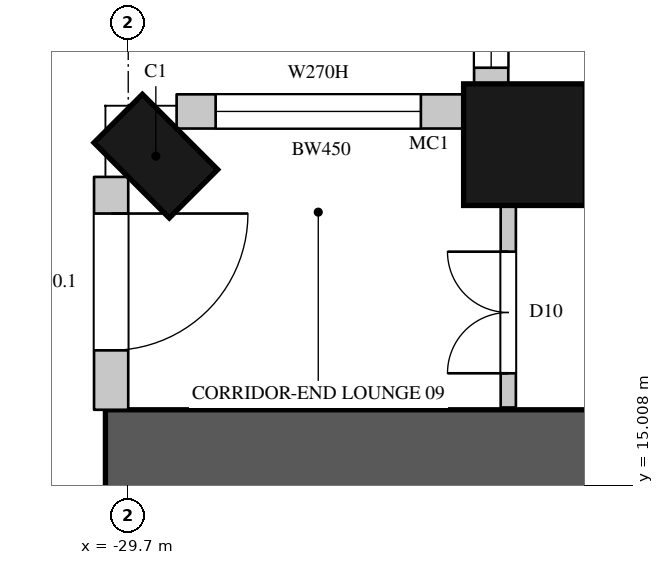
"""IFC4 building model, lengths in metres.
Left out: names, types, materials, properties, quantities, classifications, styles, units other than length and angle.
Written with IfcOpenShell. Run it as: python <this file> out.ifc"""

import sys

from ifc_helpers import new_model, si_unit, direction, frame, frame_2d, origin, origin_2d, place, context, subcontext, project, spatial, rectangle, circle, extrude, element, fill, save


model = new_model("IFC4")
c1 = context("Model", 3, precision=1e-05, world=origin(), true_north=direction((0.0, 1.0)))
c2 = subcontext(c1, "Body", "Model", "MODEL_VIEW")
j1 = project(units=[si_unit("LENGTHUNIT", "METRE"), si_unit("PLANEANGLEUNIT", "RADIAN")], contexts=[c1])
p1 = place(None, origin())
s1 = spatial("IfcSite", under=j1, at=p1, CompositionType="ELEMENT")
p2 = place(p1, origin())
s2 = spatial("IfcBuilding", under=s1, at=p2, CompositionType="ELEMENT")
p3 = place(p2, frame((0.0, 0.0, 62.7)))
s3 = spatial("IfcBuildingStorey", under=s2, at=p3, CompositionType="ELEMENT", Elevation=62.7)
p4 = place(p3, frame((-29.337, 19.337, 0.0), z_axis=(0.0, 0.0, 1.0), x_axis=(-0.707106781187, -0.707106781187, 0.0)))
e1 = element("IfcColumn", 1, at=p4, inside=s3, PredefinedType="COLUMN", context=c2, shape_type="SweptSolid", body=[
    extrude(rectangle(XDim=0.9, YDim=1.4, at=origin_2d()), origin(), (0.0, 0.0, 1.0), 3.6),
])
p5 = place(p3, frame((-24.488, 19.488, 0.0), z_axis=(0.0, 0.0, 1.0), x_axis=(1.0, 0.0, 0.0)))
e2 = element("IfcColumn", 2, at=p5, inside=s3, PredefinedType="COLUMN", context=c2, shape_type="SweptSolid", body=[
    extrude(circle(Radius=0.8, at=origin_2d()), origin(), (0.0, 0.0, 1.0), 3.6),
])
p6 = place(p3, frame((-29.925, 19.064, 0.0), z_axis=(0.0, 0.0, 1.0), x_axis=(0.0, -1.0, 0.0)))
e3 = element("IfcWall", 3, at=p6, inside=s3, PredefinedType="SOLIDWALL", context=c2, shape_type="SweptSolid", body=[
    extrude(rectangle(XDim=3.064, YDim=0.45, at=frame_2d((1.532, 0.0))), origin(), (0.0, 0.0, 1.0), 3.3),
])
p7 = place(p6, frame((0.482, 0.0, 0.0)))
e4 = element("IfcOpeningElement", 4, at=p7, cuts=e3, PredefinedType="OPENING", context=c2, shape_type="SweptSolid", body=[
    extrude(rectangle(XDim=1.8, YDim=2.4, at=frame_2d((0.9, 1.2))), frame((0.0, 0.235, 0.0), z_axis=(0.0, -1.0, 0.0), x_axis=(1.0, 0.0, 0.0)), (0.0, 0.0, 1.0), 0.47),
])
p8 = place(p3, frame((-24.925, 22.05, 0.0), z_axis=(0.0, 0.0, 1.0), x_axis=(0.0, -1.0, 0.0)))
e5 = element("IfcWall", 5, at=p8, inside=s3, PredefinedType="SOLIDWALL", context=c2, shape_type="SweptSolid", body=[
    extrude(rectangle(XDim=1.792, YDim=0.45, at=frame_2d((0.896, 0.0))), origin(), (0.0, 0.0, 1.0), 3.3),
])
p9 = place(p8, frame((0.35, 0.0, 1.05)))
e6 = element("IfcOpeningElement", 6, at=p9, cuts=e5, PredefinedType="OPENING", context=c2, shape_type="SweptSolid", body=[
    extrude(rectangle(XDim=1.2, YDim=2.0, at=frame_2d((0.6, 1.0))), frame((0.0, 0.235, 0.0), z_axis=(0.0, -1.0, 0.0), x_axis=(1.0, 0.0, 0.0)), (0.0, 0.0, 1.0), 0.47),
])
p10 = place(p3, frame((-25.259, 19.925, 0.0), z_axis=(0.0, 0.0, 1.0), x_axis=(-1.0, 0.0, 0.0)))
e7 = element("IfcWall", 7, at=p10, inside=s3, PredefinedType="SOLIDWALL", context=c2, shape_type="SweptSolid", body=[
    extrude(rectangle(XDim=3.805, YDim=0.45, at=frame_2d((1.903, 0.0))), origin(), (0.0, 0.0, 1.0), 3.3),
])
p11 = place(p10, frame((0.592, 0.0, 1.05)))
e8 = element("IfcOpeningElement", 8, at=p11, cuts=e7, PredefinedType="OPENING", context=c2, shape_type="SweptSolid", body=[
    extrude(rectangle(XDim=2.7, YDim=2.0, at=frame_2d((1.35, 1.0))), frame((0.0, 0.235, 0.0), z_axis=(0.0, -1.0, 0.0), x_axis=(1.0, 0.0, 0.0)), (0.0, 0.0, 1.0), 0.47),
])
p12 = place(p3, frame((-30.0, 15.4, 0.0), z_axis=(0.0, 0.0, 1.0), x_axis=(1.0, 0.0, 0.0)))
e9 = element("IfcWall", 9, at=p12, inside=s3, PredefinedType="SHEAR", context=c2, shape_type="SweptSolid", body=[
    extrude(rectangle(XDim=16.0, YDim=1.2, at=frame_2d((8.0, 0.0))), origin(), (0.0, 0.0, 1.0), 3.6),
])
p13 = place(p12, frame((13.4, 0.0, 0.0)))
e10 = element("IfcOpeningElement", 10, at=p13, cuts=e9, PredefinedType="OPENING", context=c2, shape_type="SweptSolid", body=[
    extrude(rectangle(XDim=1.5, YDim=2.4, at=frame_2d((0.75, 1.2))), frame((0.0, 0.61, 0.0), z_axis=(0.0, -1.0, 0.0), x_axis=(1.0, 0.0, 0.0)), (0.0, 0.0, 1.0), 1.22),
])
p14 = place(p3, frame((-24.7, 16.03, 0.0), z_axis=(0.0, 0.0, 1.0), x_axis=(0.0, 1.0, 0.0)))
e11 = element("IfcWall", 11, at=p14, inside=s3, PredefinedType="PARTITIONING", context=c2, shape_type="SweptSolid", body=[
    extrude(rectangle(XDim=2.67, YDim=0.2, at=frame_2d((1.335, 0.0))), origin(), (0.0, 0.0, 1.0), 3.3),
])
p15 = place(p14, frame((0.45, 0.0, 0.0)))
e12 = element("IfcOpeningElement", 12, at=p15, cuts=e11, PredefinedType="OPENING", context=c2, shape_type="SweptSolid", body=[
    extrude(rectangle(XDim=1.6, YDim=2.4, at=frame_2d((0.8, 1.2))), frame((0.0, 0.11, 0.0), z_axis=(0.0, -1.0, 0.0), x_axis=(1.0, 0.0, 0.0)), (0.0, 0.0, 1.0), 0.22),
])
p16 = place(p3, frame((-23.7, 19.7, 0.0), z_axis=(0.0, 0.0, 1.0), x_axis=(1.0, 0.0, 0.0)))
e13 = element("IfcWall", 13, at=p16, inside=s3, PredefinedType="PARTITIONING", context=c2, shape_type="SweptSolid", body=[
    extrude(rectangle(XDim=5.1, YDim=0.2, at=frame_2d((2.55, 0.0))), origin(), (0.0, 0.0, 1.0), 3.3),
])
p17 = place(p16, frame((0.8, 0.0, 0.0)))
e14 = element("IfcOpeningElement", 14, at=p17, cuts=e13, PredefinedType="OPENING", context=c2, shape_type="SweptSolid", body=[
    extrude(rectangle(XDim=0.9, YDim=2.2, at=frame_2d((0.45, 1.1))), frame((0.0, 0.11, 0.0), z_axis=(0.0, -1.0, 0.0), x_axis=(1.0, 0.0, 0.0)), (0.0, 0.0, 1.0), 0.22),
])
p18 = place(p16, frame((3.85, 0.0, 0.0)))
e15 = element("IfcOpeningElement", 15, at=p18, cuts=e13, PredefinedType="OPENING", context=c2, shape_type="SweptSolid", body=[
    extrude(rectangle(XDim=0.95, YDim=2.2, at=frame_2d((0.475, 1.1))), frame((0.0, 0.11, 0.0), z_axis=(0.0, -1.0, 0.0), x_axis=(1.0, 0.0, 0.0)), (0.0, 0.0, 1.0), 0.22),
])
p19 = place(p7, origin())
e16 = element("IfcDoor", 16, at=p19, inside=s3, OperationType="SLIDING_TO_LEFT", PredefinedType="DOOR", context=c2, shape_type="SweptSolid", body=[
    extrude(rectangle(XDim=1.8, YDim=2.4, at=frame_2d((0.9, 1.2))), frame((0.0, 0.13, 0.0), z_axis=(0.0, -1.0, 0.0), x_axis=(1.0, 0.0, 0.0)), (0.0, 0.0, 1.0), 0.05),
])
fill(e4, e16)
p20 = place(p9, origin())
e17 = element("IfcWindow", 17, at=p20, inside=s3, PartitioningType="SINGLE_PANEL", PredefinedType="WINDOW", context=c2, shape_type="SweptSolid", body=[
    extrude(rectangle(XDim=1.2, YDim=2.0, at=frame_2d((0.6, 1.0))), frame((0.0, 0.135, 0.0), z_axis=(0.0, -1.0, 0.0), x_axis=(1.0, 0.0, 0.0)), (0.0, 0.0, 1.0), 0.06),
])
fill(e6, e17)
p21 = place(p11, origin())
e18 = element("IfcWindow", 18, at=p21, inside=s3, PartitioningType="SINGLE_PANEL", PredefinedType="WINDOW", context=c2, shape_type="SweptSolid", body=[
    extrude(rectangle(XDim=2.7, YDim=2.0, at=frame_2d((1.35, 1.0))), frame((0.0, 0.135, 0.0), z_axis=(0.0, -1.0, 0.0), x_axis=(1.0, 0.0, 0.0)), (0.0, 0.0, 1.0), 0.06),
])
fill(e8, e18)
p22 = place(p15, origin())
e19 = element("IfcDoor", 19, at=p22, inside=s3, OperationType="DOUBLE_DOOR_SINGLE_SWING", PredefinedType="DOOR", context=c2, shape_type="SweptSolid", body=[
    extrude(rectangle(XDim=1.6, YDim=2.4, at=frame_2d((0.8, 1.2))), frame((0.0, 0.025, 0.0), z_axis=(0.0, -1.0, 0.0), x_axis=(1.0, 0.0, 0.0)), (0.0, 0.0, 1.0), 0.05),
])
fill(e12, e19)
save(model, sys.argv[1])
